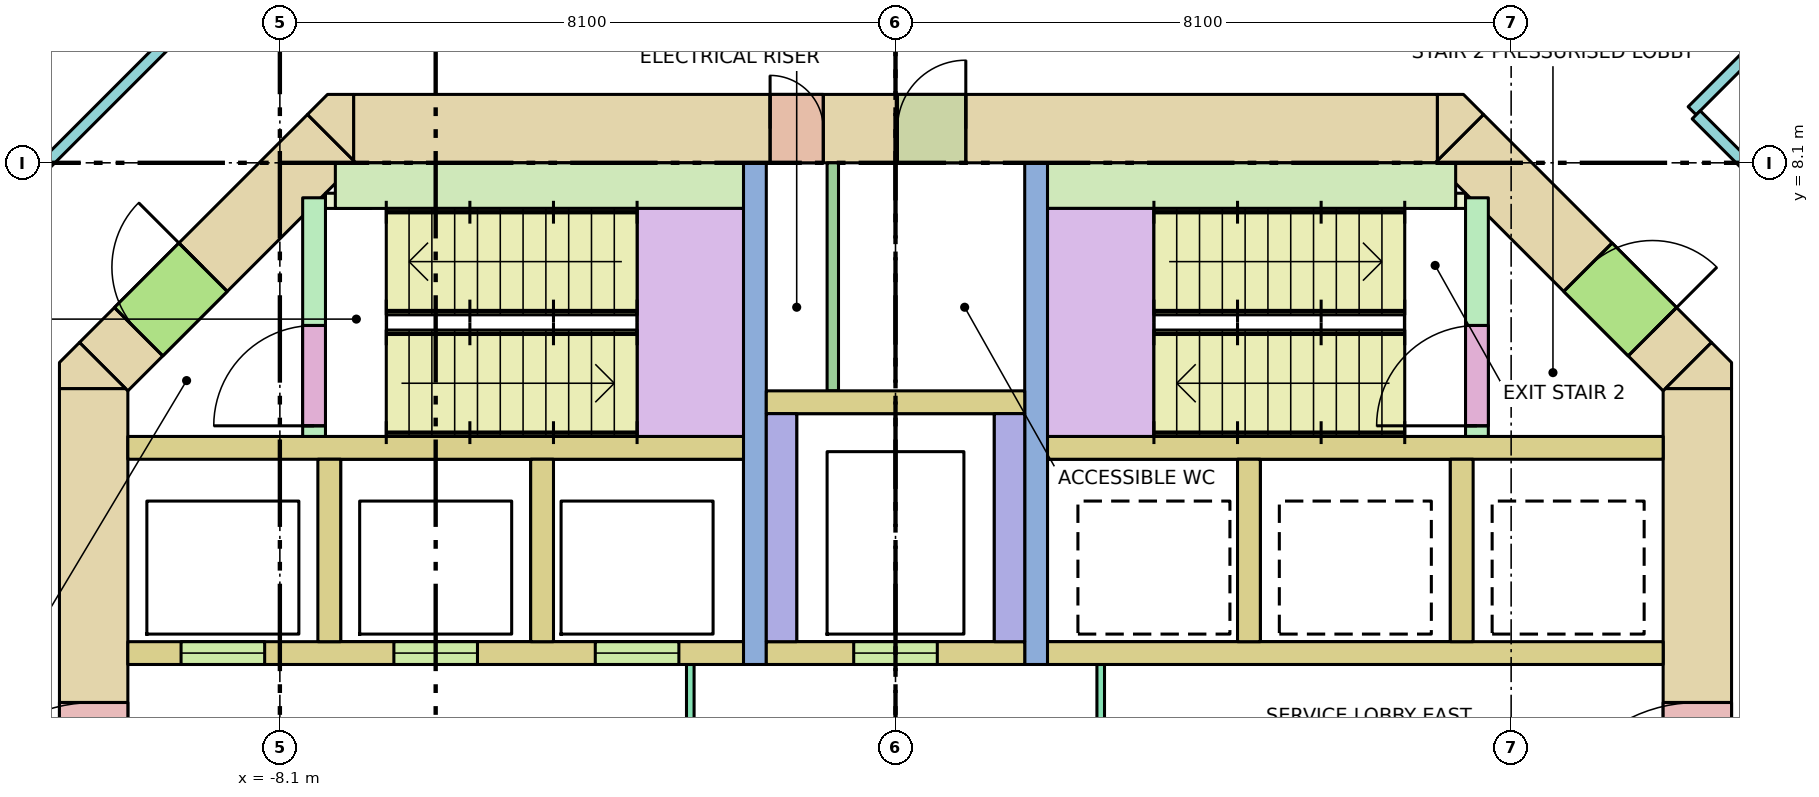
"""IFC4 building model, lengths in metres.
Left out: names, types, materials, properties, quantities, classifications, styles, units other than length and angle.
Written with IfcOpenShell. Run it as: python <this file> out.ifc"""

import sys

from ifc_helpers import new_model, si_unit, direction, frame, frame_2d, origin, place, context, subcontext, project, spatial, polyline, rectangle, outline, extrude, element, fill, save


model = new_model("IFC4")
c1 = context("Model", 3, precision=1e-05, world=origin(), true_north=direction((0.0, 1.0)))
c2 = subcontext(c1, "Body", "Model", "MODEL_VIEW")
j1 = project(units=[si_unit("LENGTHUNIT", "METRE"), si_unit("PLANEANGLEUNIT", "RADIAN")], contexts=[c1])
p1 = place(None, origin())
s1 = spatial("IfcSite", under=j1, at=p1, CompositionType="ELEMENT")
p2 = place(p1, origin())
s2 = spatial("IfcBuilding", under=s1, at=p2, CompositionType="ELEMENT")
p3 = place(p2, frame((0.0, 0.0, 51.0)))
s3 = spatial("IfcBuildingStorey", under=s2, at=p3, CompositionType="ELEMENT", Elevation=51.0)
p4 = place(p3, frame((-7.13, 8.55, -0.28), z_axis=(0.0, 0.0, 1.0), x_axis=(1.0, 0.0, 0.0)))
e1 = element("IfcWall", 1, at=p4, inside=s3, PredefinedType="SHEAR", context=c2, shape_type="SweptSolid", body=[
    extrude(rectangle(XDim=14.26, YDim=0.9, at=frame_2d((7.13, 0.0))), origin(), (0.0, 0.0, 1.0), 4.0),
])
p5 = place(p4, frame((5.48, 0.0, 0.28)))
e2 = element("IfcOpeningElement", 2, at=p5, cuts=e1, PredefinedType="OPENING", context=c2, shape_type="SweptSolid", body=[
    extrude(rectangle(XDim=0.7, YDim=2.1, at=frame_2d((0.35, 1.05))), frame((0.0, 0.46, 0.0), z_axis=(0.0, -1.0, 0.0), x_axis=(1.0, 0.0, 0.0)), (0.0, 0.0, 1.0), 0.92),
])
p6 = place(p4, frame((7.155, 0.0, 0.28)))
e3 = element("IfcOpeningElement", 3, at=p6, cuts=e1, PredefinedType="OPENING", context=c2, shape_type="SweptSolid", body=[
    extrude(rectangle(XDim=0.9, YDim=2.1, at=frame_2d((0.45, 1.05))), frame((0.0, 0.46, 0.0), z_axis=(0.0, -1.0, 0.0), x_axis=(1.0, 0.0, 0.0)), (0.0, 0.0, 1.0), 0.92),
])
p7 = place(p3, frame((-10.55, -5.13, -0.28), z_axis=(0.0, 0.0, 1.0), x_axis=(0.0, 1.0, 0.0)))
e4 = element("IfcWall", 4, at=p7, inside=s3, PredefinedType="SHEAR", context=c2, shape_type="SweptSolid", body=[
    extrude(rectangle(XDim=10.26, YDim=0.9, at=frame_2d((5.13, 0.0))), origin(), (0.0, 0.0, 1.0), 4.0),
])
p8 = place(p7, frame((4.13, 0.0, 0.28)))
e5 = element("IfcOpeningElement", 5, at=p8, cuts=e4, PredefinedType="OPENING", context=c2, shape_type="SweptSolid", body=[
    extrude(rectangle(XDim=2.0, YDim=2.1, at=frame_2d((1.0, 1.05))), frame((0.0, 0.46, 0.0), z_axis=(0.0, -1.0, 0.0), x_axis=(1.0, 0.0, 0.0)), (0.0, 0.0, 1.0), 0.92),
])
p9 = place(p3, frame((10.55, -5.13, -0.28), z_axis=(0.0, 0.0, 1.0), x_axis=(0.0, 1.0, 0.0)))
e6 = element("IfcWall", 6, at=p9, inside=s3, PredefinedType="SHEAR", context=c2, shape_type="SweptSolid", body=[
    extrude(rectangle(XDim=10.26, YDim=0.9, at=frame_2d((5.13, 0.0))), origin(), (0.0, 0.0, 1.0), 4.0),
])
p10 = place(p9, frame((4.13, 0.0, 0.28)))
e7 = element("IfcOpeningElement", 7, at=p10, cuts=e6, PredefinedType="OPENING", context=c2, shape_type="SweptSolid", body=[
    extrude(rectangle(XDim=2.0, YDim=2.1, at=frame_2d((1.0, 1.05))), frame((0.0, 0.46, 0.0), z_axis=(0.0, -1.0, 0.0), x_axis=(1.0, 0.0, 0.0)), (0.0, 0.0, 1.0), 0.92),
])
p11 = place(p3, frame((-10.418, 5.418, -0.28), z_axis=(0.0, 0.0, 1.0), x_axis=(0.707106781187, 0.707106781187, 0.0)))
e8 = element("IfcWall", 8, at=p11, inside=s3, PredefinedType="SHEAR", context=c2, shape_type="SweptSolid", body=[
    extrude(rectangle(XDim=4.243, YDim=0.9, at=frame_2d((2.121, 0.0))), origin(), (0.0, 0.0, 1.0), 4.0),
])
p12 = place(p11, frame((0.65, 0.0, 0.28)))
e9 = element("IfcOpeningElement", 9, at=p12, cuts=e8, PredefinedType="OPENING", context=c2, shape_type="SweptSolid", body=[
    extrude(rectangle(XDim=1.2, YDim=2.1, at=frame_2d((0.6, 1.05))), frame((0.0, 0.46, 0.0), z_axis=(0.0, -1.0, 0.0), x_axis=(1.0, 0.0, 0.0)), (0.0, 0.0, 1.0), 0.92),
])
p13 = place(p3, frame((7.418, 8.418, -0.28), z_axis=(0.0, 0.0, 1.0), x_axis=(0.707106781187, -0.707106781187, 0.0)))
e10 = element("IfcWall", 10, at=p13, inside=s3, PredefinedType="SHEAR", context=c2, shape_type="SweptSolid", body=[
    extrude(rectangle(XDim=4.243, YDim=0.9, at=frame_2d((2.121, 0.0))), origin(), (0.0, 0.0, 1.0), 4.0),
])
p14 = place(p13, frame((2.393, 0.0, 0.28)))
e11 = element("IfcOpeningElement", 11, at=p14, cuts=e10, PredefinedType="OPENING", context=c2, shape_type="SweptSolid", body=[
    extrude(rectangle(XDim=1.2, YDim=2.1, at=frame_2d((0.6, 1.05))), frame((0.0, 0.46, 0.0), z_axis=(0.0, -1.0, 0.0), x_axis=(1.0, 0.0, 0.0)), (0.0, 0.0, 1.0), 0.92),
])
p15 = place(p3, frame((0.0, 0.0, -0.28)))
e12 = element("IfcWall", 12, at=p15, inside=s3, PredefinedType="SHEAR", context=c2, shape_type="SweptSolid", body=[
    extrude(outline(polyline([(-10.736, 5.736), (-10.13, 5.13), (-11.0, 5.13), (-11.0, 5.473), (-10.736, 5.736)])), origin(), (0.0, 0.0, 1.0), 4.0),
])
p16 = place(p3, frame((0.0, 0.0, -0.28)))
e13 = element("IfcWall", 13, at=p16, inside=s3, PredefinedType="SHEAR", context=c2, shape_type="SweptSolid", body=[
    extrude(outline(polyline([(11.0, 5.473), (11.0, 5.13), (10.13, 5.13), (10.736, 5.736), (11.0, 5.473)])), origin(), (0.0, 0.0, 1.0), 4.0),
])
p17 = place(p3, frame((0.0, 0.0, -0.28)))
e14 = element("IfcWall", 14, at=p17, inside=s3, PredefinedType="SHEAR", context=c2, shape_type="SweptSolid", body=[
    extrude(outline(polyline([(-7.473, 9.0), (-7.13, 9.0), (-7.13, 8.13), (-7.736, 8.736), (-7.473, 9.0)])), origin(), (0.0, 0.0, 1.0), 4.0),
])
p18 = place(p3, frame((0.0, 0.0, -0.28)))
e15 = element("IfcWall", 15, at=p18, inside=s3, PredefinedType="SHEAR", context=c2, shape_type="SweptSolid", body=[
    extrude(outline(polyline([(7.473, 9.0), (7.736, 8.736), (7.13, 8.13), (7.13, 9.0), (7.473, 9.0)])), origin(), (0.0, 0.0, 1.0), 4.0),
])
for number, where, z_axis, x_axis in (
    (16, (-10.1, 4.35, 0.0), (0.0, 0.0, 1.0), (1.0, 0.0, 0.0)),
    (17, (2.0, 4.35, 0.0), (0.0, 0.0, 1.0), (1.0, 0.0, 0.0)),
):
    element("IfcWall", number, at=place(p3, frame(where, z_axis=z_axis, x_axis=x_axis)), inside=s3, PredefinedType="SOLIDWALL", context=c2, shape_type="SweptSolid", body=[
        extrude(rectangle(XDim=8.1, YDim=0.3, at=frame_2d((4.05, 0.0))), origin(), (0.0, 0.0, 1.0), 3.72),
    ])
p19 = place(p3, frame((-10.1, 1.65, 0.0), z_axis=(0.0, 0.0, 1.0), x_axis=(1.0, 0.0, 0.0)))
e18 = element("IfcWall", 18, at=p19, inside=s3, PredefinedType="SOLIDWALL", context=c2, shape_type="SweptSolid", body=[
    extrude(rectangle(XDim=8.1, YDim=0.3, at=frame_2d((4.05, 0.0))), origin(), (0.0, 0.0, 1.0), 3.72),
])
p20 = place(p19, frame((0.7, 0.0, 0.0)))
e19 = element("IfcOpeningElement", 19, at=p20, cuts=e18, PredefinedType="OPENING", context=c2, shape_type="SweptSolid", body=[
    extrude(rectangle(XDim=1.1, YDim=2.1, at=frame_2d((0.55, 1.05))), frame((0.0, 0.16, 0.0), z_axis=(0.0, -1.0, 0.0), x_axis=(1.0, 0.0, 0.0)), (0.0, 0.0, 1.0), 0.32),
])
p21 = place(p19, frame((3.5, 0.0, 0.0)))
e20 = element("IfcOpeningElement", 20, at=p21, cuts=e18, PredefinedType="OPENING", context=c2, shape_type="SweptSolid", body=[
    extrude(rectangle(XDim=1.1, YDim=2.1, at=frame_2d((0.55, 1.05))), frame((0.0, 0.16, 0.0), z_axis=(0.0, -1.0, 0.0), x_axis=(1.0, 0.0, 0.0)), (0.0, 0.0, 1.0), 0.32),
])
p22 = place(p19, frame((6.15, 0.0, 0.0)))
e21 = element("IfcOpeningElement", 21, at=p22, cuts=e18, PredefinedType="OPENING", context=c2, shape_type="SweptSolid", body=[
    extrude(rectangle(XDim=1.1, YDim=2.1, at=frame_2d((0.55, 1.05))), frame((0.0, 0.16, 0.0), z_axis=(0.0, -1.0, 0.0), x_axis=(1.0, 0.0, 0.0)), (0.0, 0.0, 1.0), 0.32),
])
p23 = place(p3, frame((2.0, 1.65, 0.0), z_axis=(0.0, 0.0, 1.0), x_axis=(1.0, 0.0, 0.0)))
e22 = element("IfcWall", 22, at=p23, inside=s3, PredefinedType="SOLIDWALL", context=c2, shape_type="SweptSolid", body=[
    extrude(rectangle(XDim=8.1, YDim=0.3, at=frame_2d((4.05, 0.0))), origin(), (0.0, 0.0, 1.0), 3.72),
])
for number, where, z_axis, x_axis in (
    (23, (-7.45, 1.8, 0.0), (0.0, 0.0, 1.0), (0.0, 1.0, 0.0)),
    (24, (-4.65, 1.8, 0.0), (0.0, 0.0, 1.0), (0.0, 1.0, 0.0)),
    (25, (4.65, 1.8, 0.0), (0.0, 0.0, 1.0), (0.0, 1.0, 0.0)),
    (26, (7.45, 1.8, 0.0), (0.0, 0.0, 1.0), (0.0, 1.0, 0.0)),
):
    element("IfcWall", number, at=place(p3, frame(where, z_axis=z_axis, x_axis=x_axis)), inside=s3, PredefinedType="SOLIDWALL", context=c2, shape_type="SweptSolid", body=[
        extrude(rectangle(XDim=2.4, YDim=0.3, at=frame_2d((1.2, 0.0))), origin(), (0.0, 0.0, 1.0), 3.72),
    ])
for number, where, z_axis, x_axis in (
    (27, (-1.85, 1.5, 0.0), (0.0, 0.0, 1.0), (0.0, 1.0, 0.0)),
    (28, (1.85, 1.5, 0.0), (0.0, 0.0, 1.0), (0.0, 1.0, 0.0)),
):
    element("IfcWall", number, at=place(p3, frame(where, z_axis=z_axis, x_axis=x_axis)), inside=s3, PredefinedType="SHEAR", context=c2, shape_type="SweptSolid", body=[
        extrude(rectangle(XDim=6.6, YDim=0.3, at=frame_2d((3.3, 0.0))), origin(), (0.0, 0.0, 1.0), 3.72),
    ])
p24 = place(p3, frame((-1.7, 1.65, 0.0), z_axis=(0.0, 0.0, 1.0), x_axis=(1.0, 0.0, 0.0)))
e29 = element("IfcWall", 29, at=p24, inside=s3, PredefinedType="SOLIDWALL", context=c2, shape_type="SweptSolid", body=[
    extrude(rectangle(XDim=3.4, YDim=0.3, at=frame_2d((1.7, 0.0))), origin(), (0.0, 0.0, 1.0), 3.72),
])
p25 = place(p24, frame((1.15, 0.0, 0.0)))
e30 = element("IfcOpeningElement", 30, at=p25, cuts=e29, PredefinedType="OPENING", context=c2, shape_type="SweptSolid", body=[
    extrude(rectangle(XDim=1.1, YDim=2.1, at=frame_2d((0.55, 1.05))), frame((0.0, 0.16, 0.0), z_axis=(0.0, -1.0, 0.0), x_axis=(1.0, 0.0, 0.0)), (0.0, 0.0, 1.0), 0.32),
])
for number, where, z_axis, x_axis in (
    (31, (-1.5, 1.8, 0.0), (0.0, 0.0, 1.0), (0.0, 1.0, 0.0)),
    (32, (1.5, 1.8, 0.0), (0.0, 0.0, 1.0), (0.0, 1.0, 0.0)),
):
    element("IfcWall", number, at=place(p3, frame(where, z_axis=z_axis, x_axis=x_axis)), inside=s3, PredefinedType="SOLIDWALL", context=c2, shape_type="SweptSolid", body=[
        extrude(rectangle(XDim=3.0, YDim=0.4, at=frame_2d((1.5, 0.0))), origin(), (0.0, 0.0, 1.0), 3.72),
    ])
p26 = place(p3, frame((-1.7, 4.95, 0.0), z_axis=(0.0, 0.0, 1.0), x_axis=(1.0, 0.0, 0.0)))
e33 = element("IfcWall", 33, at=p26, inside=s3, PredefinedType="SOLIDWALL", context=c2, shape_type="SweptSolid", body=[
    extrude(rectangle(XDim=3.4, YDim=0.3, at=frame_2d((1.7, 0.0))), origin(), (0.0, 0.0, 1.0), 3.72),
])
p27 = place(p3, frame((-7.65, 4.5, 0.0), z_axis=(0.0, 0.0, 1.0), x_axis=(0.0, 1.0, 0.0)))
e34 = element("IfcWall", 34, at=p27, inside=s3, PredefinedType="SHEAR", context=c2, shape_type="SweptSolid", body=[
    extrude(rectangle(XDim=3.14, YDim=0.3, at=frame_2d((1.57, 0.0))), origin(), (0.0, 0.0, 1.0), 3.72),
])
p28 = place(p27, frame((0.14, 0.0, 0.0)))
e35 = element("IfcOpeningElement", 35, at=p28, cuts=e34, PredefinedType="OPENING", context=c2, shape_type="SweptSolid", body=[
    extrude(rectangle(XDim=1.32, YDim=2.1, at=frame_2d((0.66, 1.05))), frame((0.0, 0.16, 0.0), z_axis=(0.0, -1.0, 0.0), x_axis=(1.0, 0.0, 0.0)), (0.0, 0.0, 1.0), 0.32),
])
p29 = place(p3, frame((-7.37, 7.8, 0.0), z_axis=(0.0, 0.0, 1.0), x_axis=(1.0, 0.0, 0.0)))
e36 = element("IfcWall", 36, at=p29, inside=s3, PredefinedType="SHEAR", context=c2, shape_type="SweptSolid", body=[
    extrude(rectangle(XDim=5.37, YDim=0.6, at=frame_2d((2.685, 0.0))), origin(), (0.0, 0.0, 1.0), 3.72),
])
p30 = place(p3, frame((7.65, 4.5, 0.0), z_axis=(0.0, 0.0, 1.0), x_axis=(0.0, 1.0, 0.0)))
e37 = element("IfcWall", 37, at=p30, inside=s3, PredefinedType="SHEAR", context=c2, shape_type="SweptSolid", body=[
    extrude(rectangle(XDim=3.14, YDim=0.3, at=frame_2d((1.57, 0.0))), origin(), (0.0, 0.0, 1.0), 3.72),
])
p31 = place(p30, frame((0.14, 0.0, 0.0)))
e38 = element("IfcOpeningElement", 38, at=p31, cuts=e37, PredefinedType="OPENING", context=c2, shape_type="SweptSolid", body=[
    extrude(rectangle(XDim=1.32, YDim=2.1, at=frame_2d((0.66, 1.05))), frame((0.0, 0.16, 0.0), z_axis=(0.0, -1.0, 0.0), x_axis=(1.0, 0.0, 0.0)), (0.0, 0.0, 1.0), 0.32),
])
p32 = place(p3, frame((2.0, 7.8, 0.0), z_axis=(0.0, 0.0, 1.0), x_axis=(1.0, 0.0, 0.0)))
e39 = element("IfcWall", 39, at=p32, inside=s3, PredefinedType="SHEAR", context=c2, shape_type="SweptSolid", body=[
    extrude(rectangle(XDim=5.37, YDim=0.6, at=frame_2d((2.685, 0.0))), origin(), (0.0, 0.0, 1.0), 3.72),
])
for number, where, z_axis, x_axis in (
    (40, (-7.5, 7.6, 0.0), (0.0, 0.0, 1.0), (1.0, 0.0, 0.0)),
    (41, (6.9, 7.6, 0.0), (0.0, 0.0, 1.0), (1.0, 0.0, 0.0)),
):
    element("IfcWall", number, at=place(p3, frame(where, z_axis=z_axis, x_axis=x_axis)), inside=s3, PredefinedType="SHEAR", context=c2, shape_type="SweptSolid", body=[
        extrude(rectangle(XDim=0.6, YDim=0.2, at=frame_2d((0.3, 0.0))), origin(), (0.0, 0.0, 1.0), 3.72),
    ])
p33 = place(p3, frame((-2.7, -1.5, 0.0), z_axis=(0.0, 0.0, 1.0), x_axis=(0.0, 1.0, 0.0)))
e42 = element("IfcWall", 42, at=p33, inside=s3, PredefinedType="PARTITIONING", context=c2, shape_type="SweptSolid", body=[
    extrude(rectangle(XDim=3.0, YDim=0.1, at=frame_2d((1.5, 0.0))), origin(), (0.0, 0.0, 1.0), 3.72),
])
p34 = place(p33, frame((0.9, 0.0, 0.0)))
e43 = element("IfcOpeningElement", 43, at=p34, cuts=e42, PredefinedType="OPENING", context=c2, shape_type="SweptSolid", body=[
    extrude(rectangle(XDim=1.2, YDim=2.1, at=frame_2d((0.6, 1.05))), frame((0.0, 0.06, 0.0), z_axis=(0.0, -1.0, 0.0), x_axis=(1.0, 0.0, 0.0)), (0.0, 0.0, 1.0), 0.12),
])
p35 = place(p3, frame((2.7, -1.5, 0.0), z_axis=(0.0, 0.0, 1.0), x_axis=(0.0, 1.0, 0.0)))
e44 = element("IfcWall", 44, at=p35, inside=s3, PredefinedType="PARTITIONING", context=c2, shape_type="SweptSolid", body=[
    extrude(rectangle(XDim=3.0, YDim=0.1, at=frame_2d((1.5, 0.0))), origin(), (0.0, 0.0, 1.0), 3.72),
])
p36 = place(p35, frame((0.9, 0.0, 0.0)))
e45 = element("IfcOpeningElement", 45, at=p36, cuts=e44, PredefinedType="OPENING", context=c2, shape_type="SweptSolid", body=[
    extrude(rectangle(XDim=1.2, YDim=2.1, at=frame_2d((0.6, 1.05))), frame((0.0, 0.06, 0.0), z_axis=(0.0, -1.0, 0.0), x_axis=(1.0, 0.0, 0.0)), (0.0, 0.0, 1.0), 0.12),
])
p37 = place(p3, frame((-0.825, 5.1, 0.0), z_axis=(0.0, 0.0, 1.0), x_axis=(0.0, 1.0, 0.0)))
e46 = element("IfcWall", 46, at=p37, inside=s3, PredefinedType="PARTITIONING", context=c2, shape_type="SweptSolid", body=[
    extrude(rectangle(XDim=3.0, YDim=0.15, at=frame_2d((1.5, 0.0))), origin(), (0.0, 0.0, 1.0), 3.72),
])
p38 = place(p3, frame((-12.975, 6.291, 0.0), z_axis=(0.0, 0.0, 1.0), x_axis=(0.707125355289, 0.707088206597, 0.0)))
e47 = element("IfcWall", 47, at=p38, inside=s3, PredefinedType="PARTITIONING", context=c2, shape_type="SweptSolid", body=[
    extrude(rectangle(XDim=6.572, YDim=0.15, at=frame_2d((3.286, 0.0))), origin(), (0.0, 0.0, 1.0), 2.82),
])
p39 = place(p3, frame((15.449, 13.752, 0.0), z_axis=(0.0, 0.0, 1.0), x_axis=(-0.707124155885, -0.707089406061, 0.0)))
e48 = element("IfcWall", 48, at=p39, inside=s3, PredefinedType="PARTITIONING", context=c2, shape_type="SweptSolid", body=[
    extrude(rectangle(XDim=7.026, YDim=0.15, at=frame_2d((3.513, 0.0))), origin(), (0.0, 0.0, 1.0), 3.72),
])
p40 = place(p39, frame((3.063, 0.0, 0.0)))
e49 = element("IfcOpeningElement", 49, at=p40, cuts=e48, PredefinedType="OPENING", context=c2, shape_type="SweptSolid", body=[
    extrude(rectangle(XDim=0.9, YDim=2.1, at=frame_2d((0.45, 1.05))), frame((0.0, 0.085, 0.0), z_axis=(0.0, -1.0, 0.0), x_axis=(1.0, 0.0, 0.0)), (0.0, 0.0, 1.0), 0.17),
])
p41 = place(p3, frame((10.534, 8.731, 0.0), z_axis=(0.0, 0.0, 1.0), x_axis=(0.707106781187, -0.707106781187, 0.0)))
e50 = element("IfcWall", 50, at=p41, inside=s3, PredefinedType="PARTITIONING", context=c2, shape_type="SweptSolid", body=[
    extrude(rectangle(XDim=3.399, YDim=0.15, at=frame_2d((1.7, 0.0))), origin(), (0.0, 0.0, 1.0), 2.82),
])
p42 = place(p20, origin())
e51 = element("IfcDoor", 51, at=p42, inside=s3, OperationType="DOUBLE_DOOR_SLIDING", PredefinedType="DOOR", context=c2, shape_type="SweptSolid", body=[
    extrude(rectangle(XDim=1.1, YDim=2.1, at=frame_2d((0.55, 1.05))), frame((0.0, 0.025, 0.0), z_axis=(0.0, -1.0, 0.0), x_axis=(1.0, 0.0, 0.0)), (0.0, 0.0, 1.0), 0.05),
])
fill(e19, e51)
p43 = place(p21, origin())
e52 = element("IfcDoor", 52, at=p43, inside=s3, OperationType="DOUBLE_DOOR_SLIDING", PredefinedType="DOOR", context=c2, shape_type="SweptSolid", body=[
    extrude(rectangle(XDim=1.1, YDim=2.1, at=frame_2d((0.55, 1.05))), frame((0.0, 0.025, 0.0), z_axis=(0.0, -1.0, 0.0), x_axis=(1.0, 0.0, 0.0)), (0.0, 0.0, 1.0), 0.05),
])
fill(e20, e52)
p44 = place(p22, origin())
e53 = element("IfcDoor", 53, at=p44, inside=s3, OperationType="DOUBLE_DOOR_SLIDING", PredefinedType="DOOR", context=c2, shape_type="SweptSolid", body=[
    extrude(rectangle(XDim=1.1, YDim=2.1, at=frame_2d((0.55, 1.05))), frame((0.0, 0.025, 0.0), z_axis=(0.0, -1.0, 0.0), x_axis=(1.0, 0.0, 0.0)), (0.0, 0.0, 1.0), 0.05),
])
fill(e21, e53)
p45 = place(p25, origin())
e54 = element("IfcDoor", 54, at=p45, inside=s3, OperationType="DOUBLE_DOOR_SLIDING", PredefinedType="DOOR", context=c2, shape_type="SweptSolid", body=[
    extrude(rectangle(XDim=1.1, YDim=2.1, at=frame_2d((0.55, 1.05))), frame((0.0, 0.025, 0.0), z_axis=(0.0, -1.0, 0.0), x_axis=(1.0, 0.0, 0.0)), (0.0, 0.0, 1.0), 0.05),
])
fill(e30, e54)
p46 = place(p28, origin())
e55 = element("IfcDoor", 55, at=p46, inside=s3, OperationType="DOUBLE_DOOR_SINGLE_SWING", PredefinedType="DOOR", context=c2, shape_type="SweptSolid", body=[
    extrude(rectangle(XDim=1.32, YDim=2.1, at=frame_2d((0.66, 1.05))), frame((0.0, 0.025, 0.0), z_axis=(0.0, -1.0, 0.0), x_axis=(1.0, 0.0, 0.0)), (0.0, 0.0, 1.0), 0.05),
])
fill(e35, e55)
p47 = place(p12, origin())
e56 = element("IfcDoor", 56, at=p47, inside=s3, OperationType="SINGLE_SWING_RIGHT", PredefinedType="DOOR", context=c2, shape_type="SweptSolid", body=[
    extrude(rectangle(XDim=1.2, YDim=2.1, at=frame_2d((0.6, 1.05))), frame((0.0, 0.025, 0.0), z_axis=(0.0, -1.0, 0.0), x_axis=(1.0, 0.0, 0.0)), (0.0, 0.0, 1.0), 0.05),
])
fill(e9, e56)
p48 = place(p31, origin())
e57 = element("IfcDoor", 57, at=p48, inside=s3, OperationType="DOUBLE_DOOR_SINGLE_SWING", PredefinedType="DOOR", context=c2, shape_type="SweptSolid", body=[
    extrude(rectangle(XDim=1.32, YDim=2.1, at=frame_2d((0.66, 1.05))), frame((0.0, 0.025, 0.0), z_axis=(0.0, -1.0, 0.0), x_axis=(1.0, 0.0, 0.0)), (0.0, 0.0, 1.0), 0.05),
])
fill(e38, e57)
p49 = place(p14, origin())
e58 = element("IfcDoor", 58, at=p49, inside=s3, OperationType="SINGLE_SWING_RIGHT", PredefinedType="DOOR", context=c2, shape_type="SweptSolid", body=[
    extrude(rectangle(XDim=1.2, YDim=2.1, at=frame_2d((0.6, 1.05))), frame((0.0, 0.025, 0.0), z_axis=(0.0, -1.0, 0.0), x_axis=(1.0, 0.0, 0.0)), (0.0, 0.0, 1.0), 0.05),
])
fill(e11, e58)
p50 = place(p8, origin())
e59 = element("IfcDoor", 59, at=p50, inside=s3, OperationType="DOUBLE_DOOR_SINGLE_SWING", PredefinedType="DOOR", context=c2, shape_type="SweptSolid", body=[
    extrude(rectangle(XDim=2.0, YDim=2.1, at=frame_2d((1.0, 1.05))), frame((0.0, 0.025, 0.0), z_axis=(0.0, -1.0, 0.0), x_axis=(1.0, 0.0, 0.0)), (0.0, 0.0, 1.0), 0.05),
])
fill(e5, e59)
p51 = place(p10, origin())
e60 = element("IfcDoor", 60, at=p51, inside=s3, OperationType="DOUBLE_DOOR_SINGLE_SWING", PredefinedType="DOOR", context=c2, shape_type="SweptSolid", body=[
    extrude(rectangle(XDim=2.0, YDim=2.1, at=frame_2d((1.0, 1.05))), frame((0.0, 0.025, 0.0), z_axis=(0.0, -1.0, 0.0), x_axis=(1.0, 0.0, 0.0)), (0.0, 0.0, 1.0), 0.05),
])
fill(e7, e60)
p52 = place(p5, origin())
e61 = element("IfcDoor", 61, at=p52, inside=s3, OperationType="SINGLE_SWING_LEFT", PredefinedType="DOOR", context=c2, shape_type="SweptSolid", body=[
    extrude(rectangle(XDim=0.7, YDim=2.1, at=frame_2d((0.35, 1.05))), frame((0.0, 0.025, 0.0), z_axis=(0.0, -1.0, 0.0), x_axis=(1.0, 0.0, 0.0)), (0.0, 0.0, 1.0), 0.05),
])
fill(e2, e61)
p53 = place(p6, origin())
e62 = element("IfcDoor", 62, at=p53, inside=s3, OperationType="SINGLE_SWING_RIGHT", PredefinedType="DOOR", context=c2, shape_type="SweptSolid", body=[
    extrude(rectangle(XDim=0.9, YDim=2.1, at=frame_2d((0.45, 1.05))), frame((0.0, 0.025, 0.0), z_axis=(0.0, -1.0, 0.0), x_axis=(1.0, 0.0, 0.0)), (0.0, 0.0, 1.0), 0.05),
])
fill(e3, e62)
save(model, sys.argv[1])
